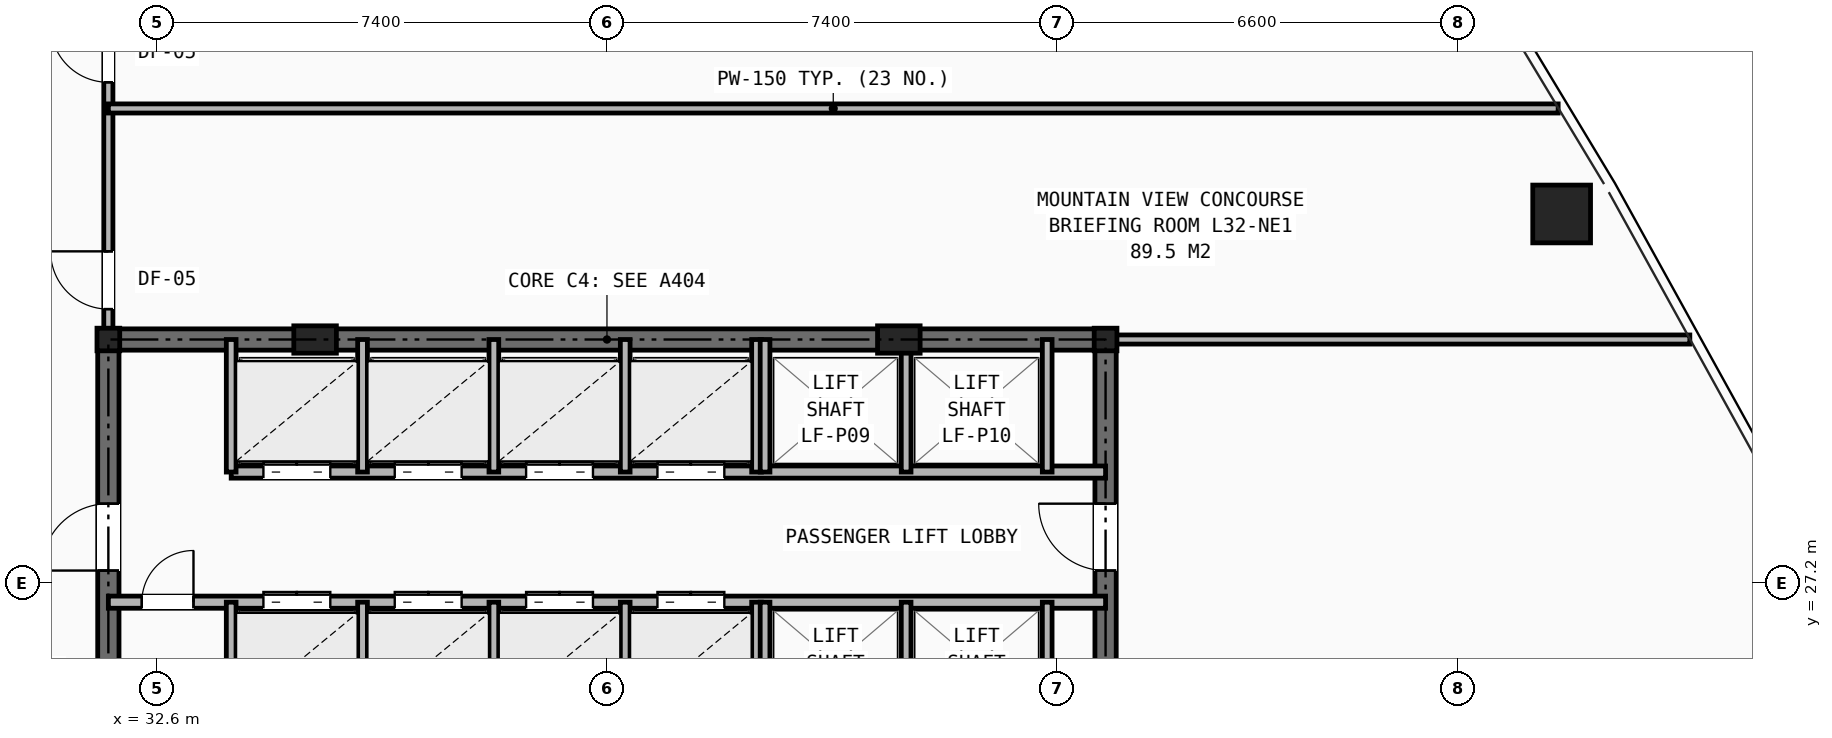
"""IFC4 building model, lengths in metres.
Left out: names, types, materials, properties, quantities, classifications, styles, units other than length and angle.
Written with IfcOpenShell. Run it as: python <this file> out.ifc"""

import sys

from ifc_helpers import new_model, si_unit, direction, frame, frame_2d, origin, origin_2d, place, context, subcontext, project, spatial, rectangle, hollow_rectangle, i_section, extrude, element, fill, save


model = new_model("IFC4")
c1 = context("Model", 3, precision=1e-05, world=origin(), true_north=direction((0.0, 1.0)))
c2 = subcontext(c1, "Body", "Model", "MODEL_VIEW")
j1 = project(units=[si_unit("LENGTHUNIT", "METRE"), si_unit("PLANEANGLEUNIT", "RADIAN")], contexts=[c1])
p1 = place(None, origin())
s1 = spatial("IfcSite", under=j1, at=p1, CompositionType="ELEMENT")
p2 = place(p1, origin())
s2 = spatial("IfcBuilding", under=s1, at=p2, CompositionType="ELEMENT")
p3 = place(p2, frame((0.0, 0.0, 111.8)))
s3 = spatial("IfcBuildingStorey", under=s2, at=p3, CompositionType="ELEMENT", Elevation=111.8)
for number, where, z_axis, x_axis in (
    (1, (31.8, 31.2, 0.0), (0.0, 0.0, 1.0), (1.0, 0.0, 0.0)),
    (2, (48.2, 31.2, 0.0), (0.0, 0.0, 1.0), (1.0, 0.0, 0.0)),
):
    element("IfcColumn", number, at=place(p3, frame(where, z_axis=z_axis, x_axis=x_axis)), inside=s3, PredefinedType="COLUMN", context=c2, shape_type="SweptSolid", body=[
        extrude(i_section(OverallWidth=0.374, OverallDepth=0.372, WebThickness=0.016, FlangeThickness=0.026, at=origin_2d()), origin(), (0.0, 0.0, 1.0), 4.2),
    ])
for number, where, z_axis, x_axis in (
    (3, (35.2, 31.2, 0.0), (0.0, 0.0, 1.0), (1.0, 0.0, 0.0)),
    (4, (44.8, 31.2, 0.0), (0.0, 0.0, 1.0), (1.0, 0.0, 0.0)),
):
    element("IfcColumn", number, at=place(p3, frame(where, z_axis=z_axis, x_axis=x_axis)), inside=s3, PredefinedType="PILASTER", context=c2, shape_type="SweptSolid", body=[
        extrude(rectangle(XDim=0.7, YDim=0.45, at=origin_2d()), origin(), (0.0, 0.0, 1.0), 4.2),
    ])
p4 = place(p3, frame((55.7, 33.265, 0.0), z_axis=(0.0, 0.0, 1.0), x_axis=(1.0, 0.0, 0.0)))
e5 = element("IfcColumn", 5, at=p4, inside=s3, PredefinedType="COLUMN", context=c2, shape_type="SweptSolid", body=[
    extrude(hollow_rectangle(XDim=0.95, YDim=0.95, WallThickness=0.065, at=origin_2d()), origin(), (0.0, 0.0, 1.0), 4.2),
])
p5 = place(p3, frame((31.8, 31.2, 0.0), z_axis=(0.0, 0.0, 1.0), x_axis=(1.0, 0.0, 0.0)))
e6 = element("IfcWall", 6, at=p5, inside=s3, PredefinedType="SHEAR", context=c2, shape_type="SweptSolid", body=[
    extrude(rectangle(XDim=16.4, YDim=0.35, at=frame_2d((8.2, 0.0))), origin(), (0.0, 0.0, 1.0), 3.96),
])
p6 = place(p3, frame((31.8, 16.4, 0.0), z_axis=(0.0, 0.0, 1.0), x_axis=(0.0, 1.0, 0.0)))
e7 = element("IfcWall", 7, at=p6, inside=s3, PredefinedType="SHEAR", context=c2, shape_type="SweptSolid", body=[
    extrude(rectangle(XDim=14.8, YDim=0.35, at=frame_2d((7.4, 0.0))), origin(), (0.0, 0.0, 1.0), 3.96),
])
p7 = place(p6, frame((11.0, 0.0, 0.0)))
e8 = element("IfcOpeningElement", 8, at=p7, cuts=e7, PredefinedType="OPENING", context=c2, shape_type="SweptSolid", body=[
    extrude(rectangle(XDim=1.1, YDim=2.15, at=frame_2d((0.55, 1.075))), frame((0.0, 0.185, 0.0), z_axis=(0.0, -1.0, 0.0), x_axis=(1.0, 0.0, 0.0)), (0.0, 0.0, 1.0), 0.37),
])
p8 = place(p3, frame((48.2, 16.4, 0.0), z_axis=(0.0, 0.0, 1.0), x_axis=(0.0, 1.0, 0.0)))
e9 = element("IfcWall", 9, at=p8, inside=s3, PredefinedType="SHEAR", context=c2, shape_type="SweptSolid", body=[
    extrude(rectangle(XDim=14.8, YDim=0.35, at=frame_2d((7.4, 0.0))), origin(), (0.0, 0.0, 1.0), 3.96),
])
p9 = place(p8, frame((11.0, 0.0, 0.0)))
e10 = element("IfcOpeningElement", 10, at=p9, cuts=e9, PredefinedType="OPENING", context=c2, shape_type="SweptSolid", body=[
    extrude(rectangle(XDim=1.1, YDim=2.15, at=frame_2d((0.55, 1.075))), frame((0.0, 0.185, 0.0), z_axis=(0.0, -1.0, 0.0), x_axis=(1.0, 0.0, 0.0)), (0.0, 0.0, 1.0), 0.37),
])
p10 = place(p3, frame((33.82, 29.02, 0.0), z_axis=(0.0, 0.0, 1.0), x_axis=(1.0, 0.0, 0.0)))
e11 = element("IfcWall", 11, at=p10, inside=s3, PredefinedType="SOLIDWALL", context=c2, shape_type="SweptSolid", body=[
    extrude(rectangle(XDim=14.38, YDim=0.2, at=frame_2d((7.19, 0.0))), origin(), (0.0, 0.0, 1.0), 3.411),
])
p11 = place(p10, frame((0.53, 0.0, 0.0)))
e12 = element("IfcOpeningElement", 12, at=p11, cuts=e11, PredefinedType="OPENING", context=c2, shape_type="SweptSolid", body=[
    extrude(rectangle(XDim=1.1, YDim=2.15, at=frame_2d((0.55, 1.075))), frame((0.0, 0.11, 0.0), z_axis=(0.0, -1.0, 0.0), x_axis=(1.0, 0.0, 0.0)), (0.0, 0.0, 1.0), 0.22),
])
p12 = place(p10, frame((2.69, 0.0, 0.0)))
e13 = element("IfcOpeningElement", 13, at=p12, cuts=e11, PredefinedType="OPENING", context=c2, shape_type="SweptSolid", body=[
    extrude(rectangle(XDim=1.1, YDim=2.15, at=frame_2d((0.55, 1.075))), frame((0.0, 0.11, 0.0), z_axis=(0.0, -1.0, 0.0), x_axis=(1.0, 0.0, 0.0)), (0.0, 0.0, 1.0), 0.22),
])
p13 = place(p10, frame((4.85, 0.0, 0.0)))
e14 = element("IfcOpeningElement", 14, at=p13, cuts=e11, PredefinedType="OPENING", context=c2, shape_type="SweptSolid", body=[
    extrude(rectangle(XDim=1.1, YDim=2.15, at=frame_2d((0.55, 1.075))), frame((0.0, 0.11, 0.0), z_axis=(0.0, -1.0, 0.0), x_axis=(1.0, 0.0, 0.0)), (0.0, 0.0, 1.0), 0.22),
])
p14 = place(p10, frame((7.01, 0.0, 0.0)))
e15 = element("IfcOpeningElement", 15, at=p14, cuts=e11, PredefinedType="OPENING", context=c2, shape_type="SweptSolid", body=[
    extrude(rectangle(XDim=1.1, YDim=2.15, at=frame_2d((0.55, 1.075))), frame((0.0, 0.11, 0.0), z_axis=(0.0, -1.0, 0.0), x_axis=(1.0, 0.0, 0.0)), (0.0, 0.0, 1.0), 0.22),
])
p15 = place(p3, frame((31.8, 26.88, 0.0), z_axis=(0.0, 0.0, 1.0), x_axis=(1.0, 0.0, 0.0)))
e16 = element("IfcWall", 16, at=p15, inside=s3, PredefinedType="SOLIDWALL", context=c2, shape_type="SweptSolid", body=[
    extrude(rectangle(XDim=16.4, YDim=0.2, at=frame_2d((8.2, 0.0))), origin(), (0.0, 0.0, 1.0), 3.411),
])
p16 = place(p15, frame((0.55, 0.0, 0.0)))
e17 = element("IfcOpeningElement", 17, at=p16, cuts=e16, PredefinedType="OPENING", context=c2, shape_type="SweptSolid", body=[
    extrude(rectangle(XDim=0.85, YDim=2.05, at=frame_2d((0.425, 1.025))), frame((0.0, 0.11, 0.0), z_axis=(0.0, -1.0, 0.0), x_axis=(1.0, 0.0, 0.0)), (0.0, 0.0, 1.0), 0.22),
])
p17 = place(p15, frame((2.55, 0.0, 0.0)))
e18 = element("IfcOpeningElement", 18, at=p17, cuts=e16, PredefinedType="OPENING", context=c2, shape_type="SweptSolid", body=[
    extrude(rectangle(XDim=1.1, YDim=2.15, at=frame_2d((0.55, 1.075))), frame((0.0, 0.11, 0.0), z_axis=(0.0, -1.0, 0.0), x_axis=(1.0, 0.0, 0.0)), (0.0, 0.0, 1.0), 0.22),
])
p18 = place(p15, frame((4.71, 0.0, 0.0)))
e19 = element("IfcOpeningElement", 19, at=p18, cuts=e16, PredefinedType="OPENING", context=c2, shape_type="SweptSolid", body=[
    extrude(rectangle(XDim=1.1, YDim=2.15, at=frame_2d((0.55, 1.075))), frame((0.0, 0.11, 0.0), z_axis=(0.0, -1.0, 0.0), x_axis=(1.0, 0.0, 0.0)), (0.0, 0.0, 1.0), 0.22),
])
p19 = place(p15, frame((6.87, 0.0, 0.0)))
e20 = element("IfcOpeningElement", 20, at=p19, cuts=e16, PredefinedType="OPENING", context=c2, shape_type="SweptSolid", body=[
    extrude(rectangle(XDim=1.1, YDim=2.15, at=frame_2d((0.55, 1.075))), frame((0.0, 0.11, 0.0), z_axis=(0.0, -1.0, 0.0), x_axis=(1.0, 0.0, 0.0)), (0.0, 0.0, 1.0), 0.22),
])
p20 = place(p15, frame((9.03, 0.0, 0.0)))
e21 = element("IfcOpeningElement", 21, at=p20, cuts=e16, PredefinedType="OPENING", context=c2, shape_type="SweptSolid", body=[
    extrude(rectangle(XDim=1.1, YDim=2.15, at=frame_2d((0.55, 1.075))), frame((0.0, 0.11, 0.0), z_axis=(0.0, -1.0, 0.0), x_axis=(1.0, 0.0, 0.0)), (0.0, 0.0, 1.0), 0.22),
])
p21 = place(p3, frame((33.82, 29.02, 0.0), z_axis=(0.0, 0.0, 1.0), x_axis=(0.0, 1.0, 0.0)))
e22 = element("IfcWall", 22, at=p21, inside=s3, PredefinedType="SOLIDWALL", context=c2, shape_type="SweptSolid", body=[
    extrude(rectangle(XDim=2.18, YDim=0.16, at=frame_2d((1.09, 0.0))), origin(), (0.0, 0.0, 1.0), 3.411),
])
p22 = place(p3, frame((33.82, 24.8, 0.0), z_axis=(0.0, 0.0, 1.0), x_axis=(0.0, 1.0, 0.0)))
e23 = element("IfcWall", 23, at=p22, inside=s3, PredefinedType="SOLIDWALL", context=c2, shape_type="SweptSolid", body=[
    extrude(rectangle(XDim=2.08, YDim=0.16, at=frame_2d((1.04, 0.0))), origin(), (0.0, 0.0, 1.0), 3.96),
])
for number, where, z_axis, x_axis in (
    (24, (35.98, 29.02, 0.0), (0.0, 0.0, 1.0), (0.0, 1.0, 0.0)),
    (25, (38.14, 29.02, 0.0), (0.0, 0.0, 1.0), (0.0, 1.0, 0.0)),
    (26, (40.3, 29.02, 0.0), (0.0, 0.0, 1.0), (0.0, 1.0, 0.0)),
    (27, (42.46, 29.02, 0.0), (0.0, 0.0, 1.0), (0.0, 1.0, 0.0)),
):
    element("IfcWall", number, at=place(p3, frame(where, z_axis=z_axis, x_axis=x_axis)), inside=s3, PredefinedType="SOLIDWALL", context=c2, shape_type="SweptSolid", body=[
        extrude(rectangle(XDim=2.18, YDim=0.16, at=frame_2d((1.09, 0.0))), origin(), (0.0, 0.0, 1.0), 3.411),
    ])
for number, where, z_axis, x_axis in (
    (28, (35.98, 24.8, 0.0), (0.0, 0.0, 1.0), (0.0, 1.0, 0.0)),
    (29, (38.14, 24.8, 0.0), (0.0, 0.0, 1.0), (0.0, 1.0, 0.0)),
    (30, (40.3, 24.8, 0.0), (0.0, 0.0, 1.0), (0.0, 1.0, 0.0)),
    (31, (42.46, 24.8, 0.0), (0.0, 0.0, 1.0), (0.0, 1.0, 0.0)),
):
    element("IfcWall", number, at=place(p3, frame(where, z_axis=z_axis, x_axis=x_axis)), inside=s3, PredefinedType="SOLIDWALL", context=c2, shape_type="SweptSolid", body=[
        extrude(rectangle(XDim=2.08, YDim=0.16, at=frame_2d((1.04, 0.0))), origin(), (0.0, 0.0, 1.0), 3.96),
    ])
for number, where, z_axis, x_axis in (
    (32, (42.6, 29.02, 0.0), (0.0, 0.0, 1.0), (0.0, 1.0, 0.0)),
    (33, (44.92, 29.02, 0.0), (0.0, 0.0, 1.0), (0.0, 1.0, 0.0)),
    (34, (47.24, 29.02, 0.0), (0.0, 0.0, 1.0), (0.0, 1.0, 0.0)),
):
    element("IfcWall", number, at=place(p3, frame(where, z_axis=z_axis, x_axis=x_axis)), inside=s3, PredefinedType="SOLIDWALL", context=c2, shape_type="SweptSolid", body=[
        extrude(rectangle(XDim=2.18, YDim=0.16, at=frame_2d((1.09, 0.0))), origin(), (0.0, 0.0, 1.0), 3.411),
    ])
for number, where, z_axis, x_axis in (
    (35, (42.6, 24.8, 0.0), (0.0, 0.0, 1.0), (0.0, 1.0, 0.0)),
    (36, (44.92, 24.8, 0.0), (0.0, 0.0, 1.0), (0.0, 1.0, 0.0)),
    (37, (47.24, 24.8, 0.0), (0.0, 0.0, 1.0), (0.0, 1.0, 0.0)),
):
    element("IfcWall", number, at=place(p3, frame(where, z_axis=z_axis, x_axis=x_axis)), inside=s3, PredefinedType="SOLIDWALL", context=c2, shape_type="SweptSolid", body=[
        extrude(rectangle(XDim=2.08, YDim=0.16, at=frame_2d((1.04, 0.0))), origin(), (0.0, 0.0, 1.0), 3.96),
    ])
p23 = place(p3, frame((31.8, 31.2, 0.0), z_axis=(0.0, 0.0, 1.0), x_axis=(0.0, 1.0, 0.0)))
e38 = element("IfcWall", 38, at=p23, inside=s3, PredefinedType="PARTITIONING", context=c2, shape_type="SweptSolid", body=[
    extrude(rectangle(XDim=5.3, YDim=0.15, at=frame_2d((2.65, 0.0))), origin(), (0.0, 0.0, 1.0), 2.975),
])
p24 = place(p23, frame((0.5, 0.0, 0.0)))
e39 = element("IfcOpeningElement", 39, at=p24, cuts=e38, PredefinedType="OPENING", context=c2, shape_type="SweptSolid", body=[
    extrude(rectangle(XDim=0.95, YDim=2.1, at=frame_2d((0.475, 1.05))), frame((0.0, 0.085, 0.0), z_axis=(0.0, -1.0, 0.0), x_axis=(1.0, 0.0, 0.0)), (0.0, 0.0, 1.0), 0.17),
])
p25 = place(p23, frame((4.23, 0.0, 0.0)))
e40 = element("IfcOpeningElement", 40, at=p25, cuts=e38, PredefinedType="OPENING", context=c2, shape_type="SweptSolid", body=[
    extrude(rectangle(XDim=0.95, YDim=2.1, at=frame_2d((0.475, 1.05))), frame((0.0, 0.085, 0.0), z_axis=(0.0, -1.0, 0.0), x_axis=(1.0, 0.0, 0.0)), (0.0, 0.0, 1.0), 0.17),
])
p26 = place(p3, frame((48.2, 31.2, 0.0), z_axis=(0.0, 0.0, 1.0), x_axis=(1.0, 0.0, 0.0)))
e41 = element("IfcWall", 41, at=p26, inside=s3, PredefinedType="PARTITIONING", context=c2, shape_type="SweptSolid", body=[
    extrude(rectangle(XDim=9.609, YDim=0.15, at=frame_2d((4.804, 0.0))), origin(), (0.0, 0.0, 1.0), 2.975),
])
p27 = place(p3, frame((31.8, 35.0, 0.0), z_axis=(0.0, 0.0, 1.0), x_axis=(1.0, 0.0, 0.0)))
e42 = element("IfcWall", 42, at=p27, inside=s3, PredefinedType="PARTITIONING", context=c2, shape_type="SweptSolid", body=[
    extrude(rectangle(XDim=23.843, YDim=0.15, at=frame_2d((11.922, 0.0))), origin(), (0.0, 0.0, 1.0), 3.248),
])
p28 = place(p16, origin())
e43 = element("IfcDoor", 43, at=p28, inside=s3, OperationType="SINGLE_SWING_RIGHT", PredefinedType="DOOR", context=c2, shape_type="SweptSolid", body=[
    extrude(rectangle(XDim=0.85, YDim=2.05, at=frame_2d((0.425, 1.025))), frame((0.0, 0.025, 0.0), z_axis=(0.0, -1.0, 0.0), x_axis=(1.0, 0.0, 0.0)), (0.0, 0.0, 1.0), 0.05),
])
fill(e17, e43)
p29 = place(p7, origin())
e44 = element("IfcDoor", 44, at=p29, inside=s3, OperationType="SINGLE_SWING_LEFT", PredefinedType="DOOR", context=c2, shape_type="SweptSolid", body=[
    extrude(rectangle(XDim=1.1, YDim=2.15, at=frame_2d((0.55, 1.075))), frame((0.0, 0.025, 0.0), z_axis=(0.0, -1.0, 0.0), x_axis=(1.0, 0.0, 0.0)), (0.0, 0.0, 1.0), 0.05),
])
fill(e8, e44)
p30 = place(p9, origin())
e45 = element("IfcDoor", 45, at=p30, inside=s3, OperationType="SINGLE_SWING_RIGHT", PredefinedType="DOOR", context=c2, shape_type="SweptSolid", body=[
    extrude(rectangle(XDim=1.1, YDim=2.15, at=frame_2d((0.55, 1.075))), frame((0.0, 0.025, 0.0), z_axis=(0.0, -1.0, 0.0), x_axis=(1.0, 0.0, 0.0)), (0.0, 0.0, 1.0), 0.05),
])
fill(e10, e45)
p31 = place(p11, origin())
e46 = element("IfcDoor", 46, at=p31, inside=s3, OperationType="DOUBLE_DOOR_SLIDING", PredefinedType="DOOR", context=c2, shape_type="SweptSolid", body=[
    extrude(rectangle(XDim=1.1, YDim=2.15, at=frame_2d((0.55, 1.075))), frame((0.0, 0.025, 0.0), z_axis=(0.0, -1.0, 0.0), x_axis=(1.0, 0.0, 0.0)), (0.0, 0.0, 1.0), 0.05),
])
fill(e12, e46)
p32 = place(p12, origin())
e47 = element("IfcDoor", 47, at=p32, inside=s3, OperationType="DOUBLE_DOOR_SLIDING", PredefinedType="DOOR", context=c2, shape_type="SweptSolid", body=[
    extrude(rectangle(XDim=1.1, YDim=2.15, at=frame_2d((0.55, 1.075))), frame((0.0, 0.025, 0.0), z_axis=(0.0, -1.0, 0.0), x_axis=(1.0, 0.0, 0.0)), (0.0, 0.0, 1.0), 0.05),
])
fill(e13, e47)
p33 = place(p13, origin())
e48 = element("IfcDoor", 48, at=p33, inside=s3, OperationType="DOUBLE_DOOR_SLIDING", PredefinedType="DOOR", context=c2, shape_type="SweptSolid", body=[
    extrude(rectangle(XDim=1.1, YDim=2.15, at=frame_2d((0.55, 1.075))), frame((0.0, 0.025, 0.0), z_axis=(0.0, -1.0, 0.0), x_axis=(1.0, 0.0, 0.0)), (0.0, 0.0, 1.0), 0.05),
])
fill(e14, e48)
p34 = place(p14, origin())
e49 = element("IfcDoor", 49, at=p34, inside=s3, OperationType="DOUBLE_DOOR_SLIDING", PredefinedType="DOOR", context=c2, shape_type="SweptSolid", body=[
    extrude(rectangle(XDim=1.1, YDim=2.15, at=frame_2d((0.55, 1.075))), frame((0.0, 0.025, 0.0), z_axis=(0.0, -1.0, 0.0), x_axis=(1.0, 0.0, 0.0)), (0.0, 0.0, 1.0), 0.05),
])
fill(e15, e49)
p35 = place(p17, origin())
e50 = element("IfcDoor", 50, at=p35, inside=s3, OperationType="DOUBLE_DOOR_SLIDING", PredefinedType="DOOR", context=c2, shape_type="SweptSolid", body=[
    extrude(rectangle(XDim=1.1, YDim=2.15, at=frame_2d((0.55, 1.075))), frame((0.0, 0.025, 0.0), z_axis=(0.0, -1.0, 0.0), x_axis=(1.0, 0.0, 0.0)), (0.0, 0.0, 1.0), 0.05),
])
fill(e18, e50)
p36 = place(p18, origin())
e51 = element("IfcDoor", 51, at=p36, inside=s3, OperationType="DOUBLE_DOOR_SLIDING", PredefinedType="DOOR", context=c2, shape_type="SweptSolid", body=[
    extrude(rectangle(XDim=1.1, YDim=2.15, at=frame_2d((0.55, 1.075))), frame((0.0, 0.025, 0.0), z_axis=(0.0, -1.0, 0.0), x_axis=(1.0, 0.0, 0.0)), (0.0, 0.0, 1.0), 0.05),
])
fill(e19, e51)
p37 = place(p19, origin())
e52 = element("IfcDoor", 52, at=p37, inside=s3, OperationType="DOUBLE_DOOR_SLIDING", PredefinedType="DOOR", context=c2, shape_type="SweptSolid", body=[
    extrude(rectangle(XDim=1.1, YDim=2.15, at=frame_2d((0.55, 1.075))), frame((0.0, 0.025, 0.0), z_axis=(0.0, -1.0, 0.0), x_axis=(1.0, 0.0, 0.0)), (0.0, 0.0, 1.0), 0.05),
])
fill(e20, e52)
p38 = place(p20, origin())
e53 = element("IfcDoor", 53, at=p38, inside=s3, OperationType="DOUBLE_DOOR_SLIDING", PredefinedType="DOOR", context=c2, shape_type="SweptSolid", body=[
    extrude(rectangle(XDim=1.1, YDim=2.15, at=frame_2d((0.55, 1.075))), frame((0.0, 0.025, 0.0), z_axis=(0.0, -1.0, 0.0), x_axis=(1.0, 0.0, 0.0)), (0.0, 0.0, 1.0), 0.05),
])
fill(e21, e53)
p39 = place(p24, origin())
e54 = element("IfcDoor", 54, at=p39, inside=s3, OperationType="SINGLE_SWING_RIGHT", PredefinedType="DOOR", context=c2, shape_type="SweptSolid", body=[
    extrude(rectangle(XDim=0.95, YDim=2.1, at=frame_2d((0.475, 1.05))), frame((0.0, 0.025, 0.0), z_axis=(0.0, -1.0, 0.0), x_axis=(1.0, 0.0, 0.0)), (0.0, 0.0, 1.0), 0.05),
])
fill(e39, e54)
p40 = place(p25, origin())
e55 = element("IfcDoor", 55, at=p40, inside=s3, OperationType="SINGLE_SWING_RIGHT", PredefinedType="DOOR", context=c2, shape_type="SweptSolid", body=[
    extrude(rectangle(XDim=0.95, YDim=2.1, at=frame_2d((0.475, 1.05))), frame((0.0, 0.025, 0.0), z_axis=(0.0, -1.0, 0.0), x_axis=(1.0, 0.0, 0.0)), (0.0, 0.0, 1.0), 0.05),
])
fill(e40, e55)
save(model, sys.argv[1])
